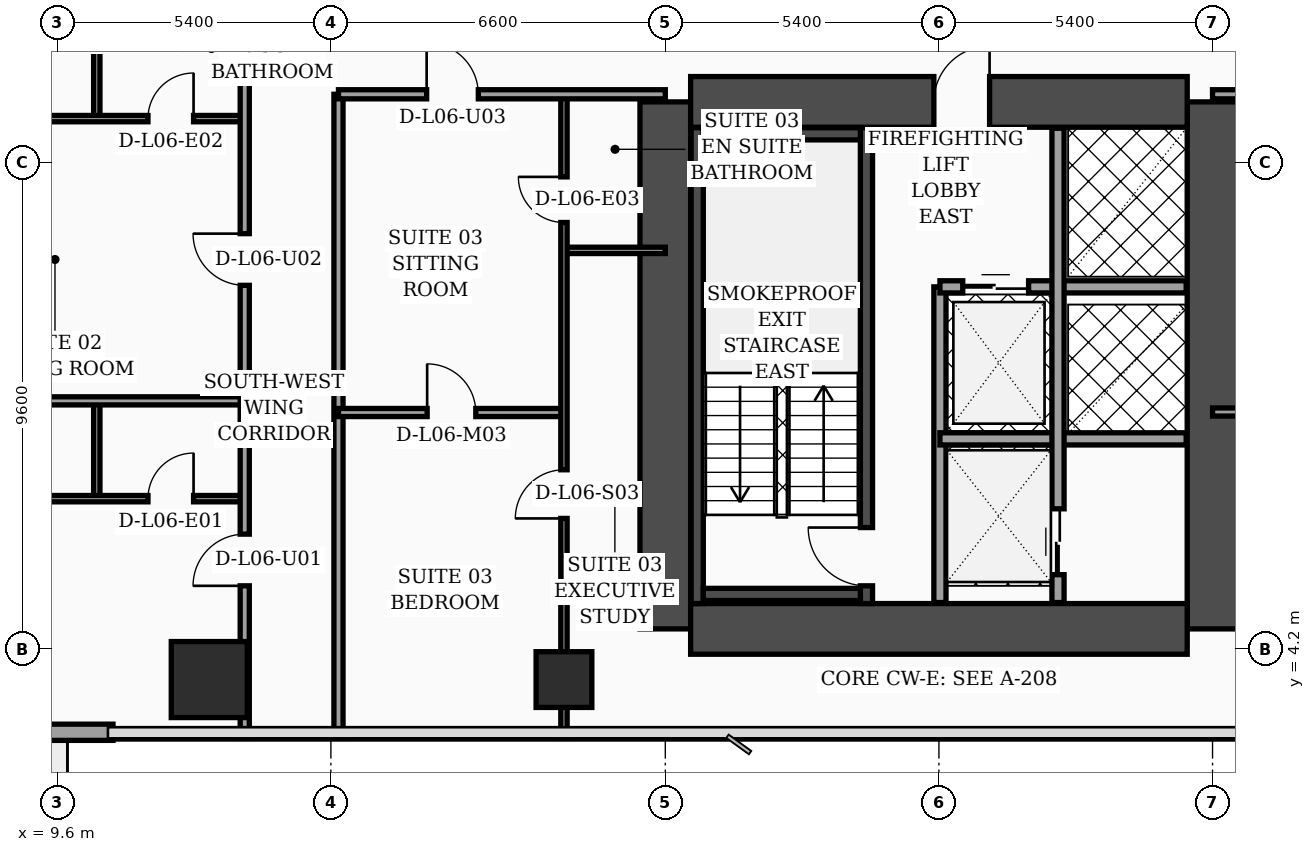
"""IFC4 building model, lengths in metres.
Left out: names, types, materials, properties, quantities, classifications, styles, units other than length and angle.
Written with IfcOpenShell. Run it as: python <this file> out.ifc"""

import sys

from ifc_helpers import new_model, si_unit, direction, frame, frame_2d, origin, origin_2d, place, context, subcontext, project, spatial, rectangle, hollow_rectangle, extrude, element, fill, save


model = new_model("IFC4")
c1 = context("Model", 3, precision=1e-05, world=origin(), true_north=direction((0.0, 1.0)))
c2 = subcontext(c1, "Body", "Model", "MODEL_VIEW")
j1 = project(units=[si_unit("LENGTHUNIT", "METRE"), si_unit("PLANEANGLEUNIT", "RADIAN")], contexts=[c1])
p1 = place(None, origin())
s1 = spatial("IfcSite", under=j1, at=p1, CompositionType="ELEMENT")
p2 = place(p1, origin())
s2 = spatial("IfcBuilding", under=s1, at=p2, CompositionType="ELEMENT")
p3 = place(p2, frame((0.0, 0.0, 30.8)))
s3 = spatial("IfcBuildingStorey", under=s2, at=p3, CompositionType="ELEMENT", Elevation=30.8)
for number, where, z_axis, x_axis in (
    (1, (21.6, 4.6, 0.0), (0.0, 0.0, 1.0), (0.0, 1.0, 0.0)),
    (2, (32.4, 4.6, 0.0), (0.0, 0.0, 1.0), (0.0, 1.0, 0.0)),
):
    element("IfcWall", number, at=place(p3, frame(where, z_axis=z_axis, x_axis=x_axis)), inside=s3, PredefinedType="SHEAR", context=c2, shape_type="SweptSolid", body=[
        extrude(rectangle(XDim=10.4, YDim=1.0, at=frame_2d((5.2, 0.0))), origin(), (0.0, 0.0, 1.0), 3.56),
    ])
p4 = place(p3, frame((22.1, 15.0, 0.0), z_axis=(0.0, 0.0, 1.0), x_axis=(1.0, 0.0, 0.0)))
e3 = element("IfcWall", 3, at=p4, inside=s3, PredefinedType="SHEAR", context=c2, shape_type="SweptSolid", body=[
    extrude(rectangle(XDim=9.8, YDim=1.0, at=frame_2d((4.9, 0.0))), origin(), (0.0, 0.0, 1.0), 3.56),
])
p5 = place(p4, frame((4.8, 0.0, 0.0)))
e4 = element("IfcOpeningElement", 4, at=p5, cuts=e3, PredefinedType="OPENING", context=c2, shape_type="SweptSolid", body=[
    extrude(rectangle(XDim=1.1, YDim=2.2, at=frame_2d((0.55, 1.1))), frame((0.0, 0.51, 0.0), z_axis=(0.0, -1.0, 0.0), x_axis=(1.0, 0.0, 0.0)), (0.0, 0.0, 1.0), 1.02),
])
p6 = place(p3, frame((22.1, 4.6, 0.0), z_axis=(0.0, 0.0, 1.0), x_axis=(1.0, 0.0, 0.0)))
e5 = element("IfcWall", 5, at=p6, inside=s3, PredefinedType="SHEAR", context=c2, shape_type="SweptSolid", body=[
    extrude(rectangle(XDim=9.8, YDim=1.0, at=frame_2d((4.9, 0.0))), origin(), (0.0, 0.0, 1.0), 3.56),
])
p7 = place(p3, frame((22.23, 5.1, 0.0), z_axis=(0.0, 0.0, 1.0), x_axis=(0.0, 1.0, 0.0)))
e6 = element("IfcWall", 6, at=p7, inside=s3, PredefinedType="SOLIDWALL", context=c2, shape_type="SweptSolid", body=[
    extrude(rectangle(XDim=9.39, YDim=0.24, at=frame_2d((4.695, 0.0))), origin(), (0.0, 0.0, 1.0), 3.56),
])
p8 = place(p3, frame((25.57, 5.1, 0.0), z_axis=(0.0, 0.0, 1.0), x_axis=(0.0, 1.0, 0.0)))
e7 = element("IfcWall", 7, at=p8, inside=s3, PredefinedType="SOLIDWALL", context=c2, shape_type="SweptSolid", body=[
    extrude(rectangle(XDim=9.39, YDim=0.24, at=frame_2d((4.695, 0.0))), origin(), (0.0, 0.0, 1.0), 3.56),
])
p9 = place(p8, frame((0.35, 0.0, 0.0)))
e8 = element("IfcOpeningElement", 8, at=p9, cuts=e7, PredefinedType="OPENING", context=c2, shape_type="SweptSolid", body=[
    extrude(rectangle(XDim=1.15, YDim=2.2, at=frame_2d((0.575, 1.1))), frame((0.0, 0.13, 0.0), z_axis=(0.0, -1.0, 0.0), x_axis=(1.0, 0.0, 0.0)), (0.0, 0.0, 1.0), 0.26),
])
for number, where, z_axis, x_axis in (
    (9, (22.35, 5.28, 0.0), (0.0, 0.0, 1.0), (1.0, 0.0, 0.0)),
    (10, (22.35, 14.37, 0.0), (0.0, 0.0, 1.0), (1.0, 0.0, 0.0)),
):
    element("IfcWall", number, at=place(p3, frame(where, z_axis=z_axis, x_axis=x_axis)), inside=s3, PredefinedType="SOLIDWALL", context=c2, shape_type="SweptSolid", body=[
        extrude(rectangle(XDim=3.1, YDim=0.24, at=frame_2d((1.55, 0.0))), origin(), (0.0, 0.0, 1.0), 3.56),
    ])
p10 = place(p3, frame((12.6, 3.6, 0.0), z_axis=(0.0, 0.0, 1.0), x_axis=(1.0, 0.0, 0.0)))
e11 = element("IfcColumn", 11, at=p10, inside=s3, PredefinedType="COLUMN", context=c2, shape_type="SweptSolid", body=[
    extrude(rectangle(XDim=1.5, YDim=1.5, at=origin_2d()), origin(), (0.0, 0.0, 1.0), 3.56),
])
p11 = place(p3, frame((19.6, 3.6, 0.0), z_axis=(0.0, 0.0, 1.0), x_axis=(1.0, 0.0, 0.0)))
e12 = element("IfcColumn", 12, at=p11, inside=s3, PredefinedType="COLUMN", context=c2, shape_type="SweptSolid", body=[
    extrude(hollow_rectangle(XDim=1.1, YDim=1.1, WallThickness=0.045, at=origin_2d()), origin(), (0.0, 0.0, 1.0), 3.56),
])
p12 = place(p3, frame((3.1, 2.56, 0.0), z_axis=(0.0, 0.0, 1.0), x_axis=(1.0, 0.0, 0.0)))
e13 = element("IfcWall", 13, at=p12, inside=s3, PredefinedType="SOLIDWALL", context=c2, shape_type="SweptSolid", body=[
    extrude(rectangle(XDim=7.6, YDim=0.32, at=frame_2d((3.8, 0.0))), origin(), (0.0, 0.0, 1.0), 3.56),
])
p13 = place(p12, frame((0.45, 0.0, 0.75)))
e14 = element("IfcOpeningElement", 14, at=p13, cuts=e13, PredefinedType="OPENING", context=c2, shape_type="SweptSolid", body=[
    extrude(rectangle(XDim=1.0, YDim=1.6, at=frame_2d((0.5, 0.8))), frame((0.0, 0.17, 0.0), z_axis=(0.0, -1.0, 0.0), x_axis=(1.0, 0.0, 0.0)), (0.0, 0.0, 1.0), 0.34),
])
p14 = place(p12, frame((3.8, 0.0, 0.0)))
e15 = element("IfcOpeningElement", 15, at=p14, cuts=e13, PredefinedType="OPENING", context=c2, shape_type="SweptSolid", body=[
    extrude(rectangle(XDim=1.4, YDim=2.25, at=frame_2d((0.7, 1.125))), frame((0.0, 0.17, 0.0), z_axis=(0.0, -1.0, 0.0), x_axis=(1.0, 0.0, 0.0)), (0.0, 0.0, 1.0), 0.34),
])
p15 = place(p3, frame((27.02, 5.12, 0.0), z_axis=(0.0, 0.0, 1.0), x_axis=(0.0, 1.0, 0.0)))
e16 = element("IfcWall", 16, at=p15, inside=s3, PredefinedType="SOLIDWALL", context=c2, shape_type="SweptSolid", body=[
    extrude(rectangle(XDim=6.23, YDim=0.24, at=frame_2d((3.115, 0.0))), origin(), (0.0, 0.0, 1.0), 3.56),
])
p16 = place(p3, frame((27.02, 11.35, 0.0), z_axis=(0.0, 0.0, 1.0), x_axis=(1.0, 0.0, 0.0)))
e17 = element("IfcWall", 17, at=p16, inside=s3, PredefinedType="SOLIDWALL", context=c2, shape_type="SweptSolid", body=[
    extrude(rectangle(XDim=4.86, YDim=0.24, at=frame_2d((2.43, 0.0))), origin(), (0.0, 0.0, 1.0), 3.56),
])
p17 = place(p16, frame((0.45, 0.0, 0.0)))
e18 = element("IfcOpeningElement", 18, at=p17, cuts=e17, PredefinedType="OPENING", context=c2, shape_type="SweptSolid", body=[
    extrude(rectangle(XDim=1.3, YDim=2.35, at=frame_2d((0.65, 1.175))), frame((0.0, 0.13, 0.0), z_axis=(0.0, -1.0, 0.0), x_axis=(1.0, 0.0, 0.0)), (0.0, 0.0, 1.0), 0.26),
])
p18 = place(p3, frame((27.02, 8.35, 0.0), z_axis=(0.0, 0.0, 1.0), x_axis=(1.0, 0.0, 0.0)))
e19 = element("IfcWall", 19, at=p18, inside=s3, PredefinedType="SOLIDWALL", context=c2, shape_type="SweptSolid", body=[
    extrude(rectangle(XDim=4.86, YDim=0.24, at=frame_2d((2.43, 0.0))), origin(), (0.0, 0.0, 1.0), 3.56),
])
p19 = place(p3, frame((29.35, 5.12, 0.0), z_axis=(0.0, 0.0, 1.0), x_axis=(0.0, 1.0, 0.0)))
e20 = element("IfcWall", 20, at=p19, inside=s3, PredefinedType="SOLIDWALL", context=c2, shape_type="SweptSolid", body=[
    extrude(rectangle(XDim=9.36, YDim=0.24, at=frame_2d((4.68, 0.0))), origin(), (0.0, 0.0, 1.0), 3.56),
])
p20 = place(p19, frame((0.55, 0.0, 0.0)))
e21 = element("IfcOpeningElement", 21, at=p20, cuts=e20, PredefinedType="OPENING", context=c2, shape_type="SweptSolid", body=[
    extrude(rectangle(XDim=1.3, YDim=2.35, at=frame_2d((0.65, 1.175))), frame((0.0, 0.13, 0.0), z_axis=(0.0, -1.0, 0.0), x_axis=(1.0, 0.0, 0.0)), (0.0, 0.0, 1.0), 0.26),
])
p21 = place(p3, frame((10.38, 7.17, 0.0), z_axis=(0.0, 0.0, 1.0), x_axis=(0.0, 1.0, 0.0)))
e22 = element("IfcWall", 22, at=p21, inside=s3, PredefinedType="PARTITIONING", context=c2, shape_type="SweptSolid", body=[
    extrude(rectangle(XDim=1.93, YDim=0.125, at=frame_2d((0.965, 0.0))), origin(), (0.0, 0.0, 1.0), 3.09),
])
p22 = place(p3, frame((3.2, 7.17, 0.0), z_axis=(0.0, 0.0, 1.0), x_axis=(1.0, 0.0, 0.0)))
e23 = element("IfcWall", 23, at=p22, inside=s3, PredefinedType="PARTITIONING", context=c2, shape_type="SweptSolid", body=[
    extrude(rectangle(XDim=10.1, YDim=0.125, at=frame_2d((5.05, 0.0))), origin(), (0.0, 0.0, 1.0), 2.84),
])
p23 = place(p22, frame((3.29, 0.0, 0.0)))
e24 = element("IfcOpeningElement", 24, at=p23, cuts=e23, PredefinedType="OPENING", context=c2, shape_type="SweptSolid", body=[
    extrude(rectangle(XDim=0.96, YDim=2.2, at=frame_2d((0.48, 1.1))), frame((0.0, 0.073, 0.0), z_axis=(0.0, -1.0, 0.0), x_axis=(1.0, 0.0, 0.0)), (0.0, 0.0, 1.0), 0.145),
])
p24 = place(p22, frame((8.19, 0.0, 0.0)))
e25 = element("IfcOpeningElement", 25, at=p24, cuts=e23, PredefinedType="OPENING", context=c2, shape_type="SweptSolid", body=[
    extrude(rectangle(XDim=0.9, YDim=2.15, at=frame_2d((0.45, 1.075))), frame((0.0, 0.073, 0.0), z_axis=(0.0, -1.0, 0.0), x_axis=(1.0, 0.0, 0.0)), (0.0, 0.0, 1.0), 0.145),
])
p25 = place(p3, frame((10.38, 14.67, 0.0), z_axis=(0.0, 0.0, 1.0), x_axis=(0.0, 1.0, 0.0)))
e26 = element("IfcWall", 26, at=p25, inside=s3, PredefinedType="PARTITIONING", context=c2, shape_type="SweptSolid", body=[
    extrude(rectangle(XDim=2.13, YDim=0.125, at=frame_2d((1.065, 0.0))), origin(), (0.0, 0.0, 1.0), 3.56),
])
p26 = place(p3, frame((0.08, 14.67, 0.0), z_axis=(0.0, 0.0, 1.0), x_axis=(1.0, 0.0, 0.0)))
e27 = element("IfcWall", 27, at=p26, inside=s3, PredefinedType="PARTITIONING", context=c2, shape_type="SweptSolid", body=[
    extrude(rectangle(XDim=13.22, YDim=0.125, at=frame_2d((6.61, 0.0))), origin(), (0.0, 0.0, 1.0), 2.84),
])
p27 = place(p26, frame((4.67, 0.0, 0.0)))
e28 = element("IfcOpeningElement", 28, at=p27, cuts=e27, PredefinedType="OPENING", context=c2, shape_type="SweptSolid", body=[
    extrude(rectangle(XDim=0.96, YDim=2.2, at=frame_2d((0.48, 1.1))), frame((0.0, 0.073, 0.0), z_axis=(0.0, -1.0, 0.0), x_axis=(1.0, 0.0, 0.0)), (0.0, 0.0, 1.0), 0.145),
])
p28 = place(p26, frame((11.31, 0.0, 0.0)))
e29 = element("IfcOpeningElement", 29, at=p28, cuts=e27, PredefinedType="OPENING", context=c2, shape_type="SweptSolid", body=[
    extrude(rectangle(XDim=0.9, YDim=2.15, at=frame_2d((0.45, 1.075))), frame((0.0, 0.073, 0.0), z_axis=(0.0, -1.0, 0.0), x_axis=(1.0, 0.0, 0.0)), (0.0, 0.0, 1.0), 0.145),
])
p29 = place(p3, frame((0.08, 9.1, 0.0), z_axis=(0.0, 0.0, 1.0), x_axis=(1.0, 0.0, 0.0)))
e30 = element("IfcWall", 30, at=p29, inside=s3, PredefinedType="PARTITIONING", context=c2, shape_type="SweptSolid", body=[
    extrude(rectangle(XDim=13.22, YDim=0.16, at=frame_2d((6.61, 0.0))), origin(), (0.0, 0.0, 1.0), 2.84),
])
p30 = place(p3, frame((13.3, 2.44, 0.0), z_axis=(0.0, 0.0, 1.0), x_axis=(0.0, 1.0, 0.0)))
e31 = element("IfcWall", 31, at=p30, inside=s3, PredefinedType="PARTITIONING", context=c2, shape_type="SweptSolid", body=[
    extrude(rectangle(XDim=14.36, YDim=0.18, at=frame_2d((7.18, 0.0))), origin(), (0.0, 0.0, 1.0), 3.04),
])
p31 = place(p30, frame((3.01, 0.0, 0.0)))
e32 = element("IfcOpeningElement", 32, at=p31, cuts=e31, PredefinedType="OPENING", context=c2, shape_type="SweptSolid", body=[
    extrude(rectangle(XDim=1.02, YDim=2.2, at=frame_2d((0.51, 1.1))), frame((0.0, 0.1, 0.0), z_axis=(0.0, -1.0, 0.0), x_axis=(1.0, 0.0, 0.0)), (0.0, 0.0, 1.0), 0.2),
])
p32 = place(p30, frame((8.94, 0.0, 0.0)))
e33 = element("IfcOpeningElement", 33, at=p32, cuts=e31, PredefinedType="OPENING", context=c2, shape_type="SweptSolid", body=[
    extrude(rectangle(XDim=1.02, YDim=2.2, at=frame_2d((0.51, 1.1))), frame((0.0, 0.1, 0.0), z_axis=(0.0, -1.0, 0.0), x_axis=(1.0, 0.0, 0.0)), (0.0, 0.0, 1.0), 0.2),
])
p33 = place(p3, frame((15.15, 2.44, 0.0), z_axis=(0.0, 0.0, 1.0), x_axis=(0.0, 1.0, 0.0)))
e34 = element("IfcWall", 34, at=p33, inside=s3, PredefinedType="PARTITIONING", context=c2, shape_type="SweptSolid", body=[
    extrude(rectangle(XDim=12.71, YDim=0.18, at=frame_2d((6.355, 0.0))), origin(), (0.0, 0.0, 1.0), 3.04),
])
p34 = place(p3, frame((19.6, 12.07, 0.0), z_axis=(0.0, 0.0, 1.0), x_axis=(1.0, 0.0, 0.0)))
e35 = element("IfcWall", 35, at=p34, inside=s3, PredefinedType="PARTITIONING", context=c2, shape_type="SweptSolid", body=[
    extrude(rectangle(XDim=2.0, YDim=0.125, at=frame_2d((1.0, 0.0))), origin(), (0.0, 0.0, 1.0), 3.56),
])
p35 = place(p3, frame((15.15, 8.87, 0.0), z_axis=(0.0, 0.0, 1.0), x_axis=(1.0, 0.0, 0.0)))
e36 = element("IfcWall", 36, at=p35, inside=s3, PredefinedType="PARTITIONING", context=c2, shape_type="SweptSolid", body=[
    extrude(rectangle(XDim=4.45, YDim=0.16, at=frame_2d((2.225, 0.0))), origin(), (0.0, 0.0, 1.0), 3.56),
])
p36 = place(p35, frame((1.75, 0.0, 0.0)))
e37 = element("IfcOpeningElement", 37, at=p36, cuts=e36, PredefinedType="OPENING", context=c2, shape_type="SweptSolid", body=[
    extrude(rectangle(XDim=0.96, YDim=2.2, at=frame_2d((0.48, 1.1))), frame((0.0, 0.09, 0.0), z_axis=(0.0, -1.0, 0.0), x_axis=(1.0, 0.0, 0.0)), (0.0, 0.0, 1.0), 0.18),
])
p37 = place(p3, frame((19.6, 2.44, 0.0), z_axis=(0.0, 0.0, 1.0), x_axis=(0.0, 1.0, 0.0)))
e38 = element("IfcWall", 38, at=p37, inside=s3, PredefinedType="PARTITIONING", context=c2, shape_type="SweptSolid", body=[
    extrude(rectangle(XDim=12.71, YDim=0.125, at=frame_2d((6.355, 0.0))), origin(), (0.0, 0.0, 1.0), 2.34),
])
p38 = place(p37, frame((4.34, 0.0, 0.0)))
e39 = element("IfcOpeningElement", 39, at=p38, cuts=e38, PredefinedType="OPENING", context=c2, shape_type="SweptSolid", body=[
    extrude(rectangle(XDim=0.96, YDim=2.2, at=frame_2d((0.48, 1.1))), frame((0.0, 0.073, 0.0), z_axis=(0.0, -1.0, 0.0), x_axis=(1.0, 0.0, 0.0)), (0.0, 0.0, 1.0), 0.145),
])
p39 = place(p37, frame((10.18, 0.0, 0.0)))
e40 = element("IfcOpeningElement", 40, at=p39, cuts=e38, PredefinedType="OPENING", context=c2, shape_type="SweptSolid", body=[
    extrude(rectangle(XDim=0.9, YDim=2.15, at=frame_2d((0.45, 1.075))), frame((0.0, 0.073, 0.0), z_axis=(0.0, -1.0, 0.0), x_axis=(1.0, 0.0, 0.0)), (0.0, 0.0, 1.0), 0.145),
])
p40 = place(p3, frame((15.15, 15.15, 0.0), z_axis=(0.0, 0.0, 1.0), x_axis=(1.0, 0.0, 0.0)))
e41 = element("IfcWall", 41, at=p40, inside=s3, PredefinedType="PARTITIONING", context=c2, shape_type="SweptSolid", body=[
    extrude(rectangle(XDim=6.45, YDim=0.18, at=frame_2d((3.225, 0.0))), origin(), (0.0, 0.0, 1.0), 2.34),
])
p41 = place(p40, frame((1.74, 0.0, 0.0)))
e42 = element("IfcOpeningElement", 42, at=p41, cuts=e41, PredefinedType="OPENING", context=c2, shape_type="SweptSolid", body=[
    extrude(rectangle(XDim=1.02, YDim=2.2, at=frame_2d((0.51, 1.1))), frame((0.0, 0.1, 0.0), z_axis=(0.0, -1.0, 0.0), x_axis=(1.0, 0.0, 0.0)), (0.0, 0.0, 1.0), 0.2),
])
p42 = place(p3, frame((32.4, 8.88, 0.0), z_axis=(0.0, 0.0, 1.0), x_axis=(1.0, 0.0, 0.0)))
e43 = element("IfcWall", 43, at=p42, inside=s3, PredefinedType="PARTITIONING", context=c2, shape_type="SweptSolid", body=[
    extrude(rectangle(XDim=4.95, YDim=0.16, at=frame_2d((2.475, 0.0))), origin(), (0.0, 0.0, 1.0), 2.84),
])
p43 = place(p42, frame((2.0, 0.0, 0.0)))
e44 = element("IfcOpeningElement", 44, at=p43, cuts=e43, PredefinedType="OPENING", context=c2, shape_type="SweptSolid", body=[
    extrude(rectangle(XDim=0.96, YDim=2.2, at=frame_2d((0.48, 1.1))), frame((0.0, 0.09, 0.0), z_axis=(0.0, -1.0, 0.0), x_axis=(1.0, 0.0, 0.0)), (0.0, 0.0, 1.0), 0.18),
])
p44 = place(p3, frame((32.4, 15.15, 0.0), z_axis=(0.0, 0.0, 1.0), x_axis=(1.0, 0.0, 0.0)))
e45 = element("IfcWall", 45, at=p44, inside=s3, PredefinedType="PARTITIONING", context=c2, shape_type="SweptSolid", body=[
    extrude(rectangle(XDim=22.8, YDim=0.18, at=frame_2d((11.4, 0.0))), origin(), (0.0, 0.0, 1.0), 2.84),
])
p45 = place(p44, frame((2.07, 0.0, 0.0)))
e46 = element("IfcOpeningElement", 46, at=p45, cuts=e45, PredefinedType="OPENING", context=c2, shape_type="SweptSolid", body=[
    extrude(rectangle(XDim=1.02, YDim=2.2, at=frame_2d((0.51, 1.1))), frame((0.0, 0.1, 0.0), z_axis=(0.0, -1.0, 0.0), x_axis=(1.0, 0.0, 0.0)), (0.0, 0.0, 1.0), 0.2),
])
p46 = place(p44, frame((9.5, 0.0, 0.0)))
e47 = element("IfcOpeningElement", 47, at=p46, cuts=e45, PredefinedType="OPENING", context=c2, shape_type="SweptSolid", body=[
    extrude(rectangle(XDim=1.02, YDim=2.2, at=frame_2d((0.51, 1.1))), frame((0.0, 0.1, 0.0), z_axis=(0.0, -1.0, 0.0), x_axis=(1.0, 0.0, 0.0)), (0.0, 0.0, 1.0), 0.2),
])
p47 = place(p44, frame((17.46, 0.0, 0.0)))
e48 = element("IfcOpeningElement", 48, at=p47, cuts=e45, PredefinedType="OPENING", context=c2, shape_type="SweptSolid", body=[
    extrude(rectangle(XDim=1.02, YDim=2.2, at=frame_2d((0.51, 1.1))), frame((0.0, 0.1, 0.0), z_axis=(0.0, -1.0, 0.0), x_axis=(1.0, 0.0, 0.0)), (0.0, 0.0, 1.0), 0.2),
])
p48 = place(p17, origin())
e49 = element("IfcDoor", 49, at=p48, inside=s3, OperationType="DOUBLE_DOOR_SLIDING", PredefinedType="DOOR", context=c2, shape_type="SweptSolid", body=[
    extrude(rectangle(XDim=1.3, YDim=2.35, at=frame_2d((0.65, 1.175))), frame((0.0, 0.025, 0.0), z_axis=(0.0, -1.0, 0.0), x_axis=(1.0, 0.0, 0.0)), (0.0, 0.0, 1.0), 0.05),
])
fill(e18, e49)
p49 = place(p20, origin())
e50 = element("IfcDoor", 50, at=p49, inside=s3, OperationType="DOUBLE_DOOR_SLIDING", PredefinedType="DOOR", context=c2, shape_type="SweptSolid", body=[
    extrude(rectangle(XDim=1.3, YDim=2.35, at=frame_2d((0.65, 1.175))), frame((0.0, 0.025, 0.0), z_axis=(0.0, -1.0, 0.0), x_axis=(1.0, 0.0, 0.0)), (0.0, 0.0, 1.0), 0.05),
])
fill(e21, e50)
p50 = place(p24, origin())
e51 = element("IfcDoor", 51, at=p50, inside=s3, OperationType="SINGLE_SWING_RIGHT", PredefinedType="DOOR", context=c2, shape_type="SweptSolid", body=[
    extrude(rectangle(XDim=0.9, YDim=2.15, at=frame_2d((0.45, 1.075))), frame((0.0, 0.025, 0.0), z_axis=(0.0, -1.0, 0.0), x_axis=(1.0, 0.0, 0.0)), (0.0, 0.0, 1.0), 0.05),
])
fill(e25, e51)
p51 = place(p28, origin())
e52 = element("IfcDoor", 52, at=p51, inside=s3, OperationType="SINGLE_SWING_RIGHT", PredefinedType="DOOR", context=c2, shape_type="SweptSolid", body=[
    extrude(rectangle(XDim=0.9, YDim=2.15, at=frame_2d((0.45, 1.075))), frame((0.0, 0.025, 0.0), z_axis=(0.0, -1.0, 0.0), x_axis=(1.0, 0.0, 0.0)), (0.0, 0.0, 1.0), 0.05),
])
fill(e29, e52)
p52 = place(p31, origin())
e53 = element("IfcDoor", 53, at=p52, inside=s3, OperationType="SINGLE_SWING_LEFT", PredefinedType="DOOR", context=c2, shape_type="SweptSolid", body=[
    extrude(rectangle(XDim=1.02, YDim=2.2, at=frame_2d((0.51, 1.1))), frame((0.0, 0.025, 0.0), z_axis=(0.0, -1.0, 0.0), x_axis=(1.0, 0.0, 0.0)), (0.0, 0.0, 1.0), 0.05),
])
fill(e32, e53)
p53 = place(p32, origin())
e54 = element("IfcDoor", 54, at=p53, inside=s3, OperationType="SINGLE_SWING_RIGHT", PredefinedType="DOOR", context=c2, shape_type="SweptSolid", body=[
    extrude(rectangle(XDim=1.02, YDim=2.2, at=frame_2d((0.51, 1.1))), frame((0.0, 0.025, 0.0), z_axis=(0.0, -1.0, 0.0), x_axis=(1.0, 0.0, 0.0)), (0.0, 0.0, 1.0), 0.05),
])
fill(e33, e54)
p54 = place(p36, origin())
e55 = element("IfcDoor", 55, at=p54, inside=s3, OperationType="SINGLE_SWING_LEFT", PredefinedType="DOOR", context=c2, shape_type="SweptSolid", body=[
    extrude(rectangle(XDim=0.96, YDim=2.2, at=frame_2d((0.48, 1.1))), frame((0.0, 0.025, 0.0), z_axis=(0.0, -1.0, 0.0), x_axis=(1.0, 0.0, 0.0)), (0.0, 0.0, 1.0), 0.05),
])
fill(e37, e55)
p55 = place(p38, origin())
e56 = element("IfcDoor", 56, at=p55, inside=s3, OperationType="SINGLE_SWING_LEFT", PredefinedType="DOOR", context=c2, shape_type="SweptSolid", body=[
    extrude(rectangle(XDim=0.96, YDim=2.2, at=frame_2d((0.48, 1.1))), frame((0.0, 0.025, 0.0), z_axis=(0.0, -1.0, 0.0), x_axis=(1.0, 0.0, 0.0)), (0.0, 0.0, 1.0), 0.05),
])
fill(e39, e56)
p56 = place(p39, origin())
e57 = element("IfcDoor", 57, at=p56, inside=s3, OperationType="SINGLE_SWING_RIGHT", PredefinedType="DOOR", context=c2, shape_type="SweptSolid", body=[
    extrude(rectangle(XDim=0.9, YDim=2.15, at=frame_2d((0.45, 1.075))), frame((0.0, 0.025, 0.0), z_axis=(0.0, -1.0, 0.0), x_axis=(1.0, 0.0, 0.0)), (0.0, 0.0, 1.0), 0.05),
])
fill(e40, e57)
p57 = place(p41, origin())
e58 = element("IfcDoor", 58, at=p57, inside=s3, OperationType="SINGLE_SWING_LEFT", PredefinedType="DOOR", context=c2, shape_type="SweptSolid", body=[
    extrude(rectangle(XDim=1.02, YDim=2.2, at=frame_2d((0.51, 1.1))), frame((0.0, 0.025, 0.0), z_axis=(0.0, -1.0, 0.0), x_axis=(1.0, 0.0, 0.0)), (0.0, 0.0, 1.0), 0.05),
])
fill(e42, e58)
p58 = place(p9, origin())
e59 = element("IfcDoor", 59, at=p58, inside=s3, OperationType="SINGLE_SWING_RIGHT", PredefinedType="DOOR", context=c2, shape_type="SweptSolid", body=[
    extrude(rectangle(XDim=1.15, YDim=2.2, at=frame_2d((0.575, 1.1))), frame((0.0, 0.025, 0.0), z_axis=(0.0, -1.0, 0.0), x_axis=(1.0, 0.0, 0.0)), (0.0, 0.0, 1.0), 0.05),
])
fill(e8, e59)
p59 = place(p5, origin())
e60 = element("IfcDoor", 60, at=p59, inside=s3, OperationType="SINGLE_SWING_RIGHT", PredefinedType="DOOR", context=c2, shape_type="SweptSolid", body=[
    extrude(rectangle(XDim=1.1, YDim=2.2, at=frame_2d((0.55, 1.1))), frame((0.0, 0.025, 0.0), z_axis=(0.0, -1.0, 0.0), x_axis=(1.0, 0.0, 0.0)), (0.0, 0.0, 1.0), 0.05),
])
fill(e4, e60)
save(model, sys.argv[1])
